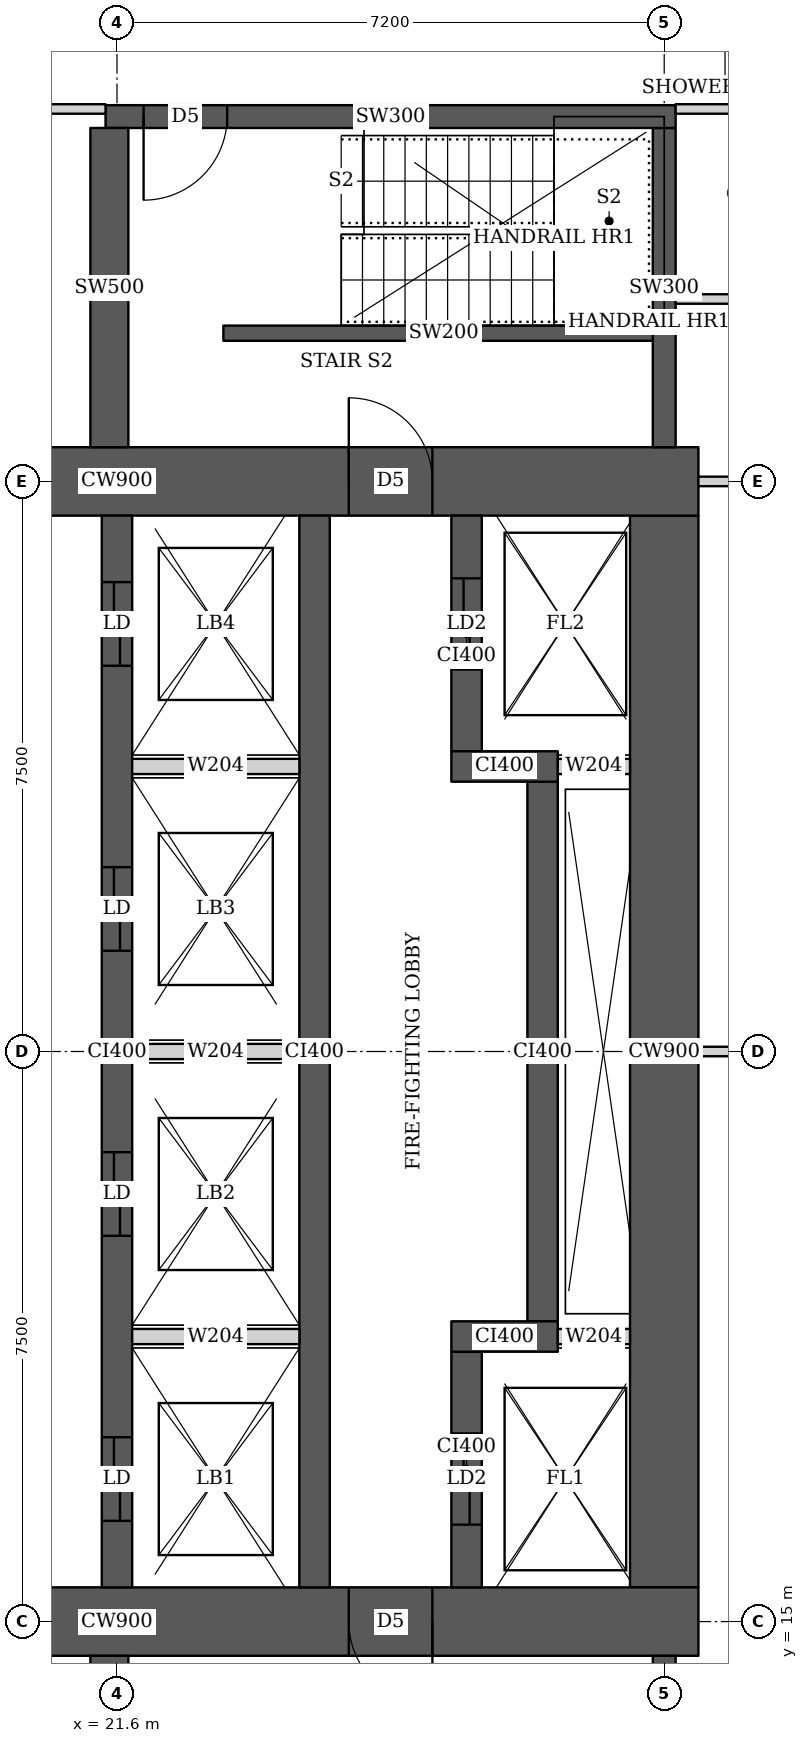
"""IFC4 building model, lengths in metres.
Left out: names, types, materials, properties, quantities, classifications, styles, units other than length and angle.
Written with IfcOpenShell. Run it as: python <this file> out.ifc"""

import sys

from ifc_helpers import new_model, si_unit, direction, frame, frame_2d, origin, place, context, subcontext, project, spatial, rectangle, extrude, element, fill, save


model = new_model("IFC4")
c1 = context("Model", 3, precision=1e-05, world=origin(), true_north=direction((0.0, 1.0)))
c2 = subcontext(c1, "Body", "Model", "MODEL_VIEW")
j1 = project(units=[si_unit("LENGTHUNIT", "METRE"), si_unit("PLANEANGLEUNIT", "RADIAN")], contexts=[c1])
p1 = place(None, origin())
s1 = spatial("IfcSite", under=j1, at=p1, CompositionType="ELEMENT")
p2 = place(p1, origin())
s2 = spatial("IfcBuilding", under=s1, at=p2, CompositionType="ELEMENT")
p3 = place(p2, frame((0.0, 0.0, 242.45)))
s3 = spatial("IfcBuildingStorey", under=s2, at=p3, CompositionType="ELEMENT", Elevation=242.45)
p4 = place(p3, frame((13.95, 15.0, 0.0), z_axis=(0.0, 0.0, 1.0), x_axis=(1.0, 0.0, 0.0)))
e1 = element("IfcWall", 1, at=p4, inside=s3, PredefinedType="SHEAR", context=c2, shape_type="SweptSolid", body=[
    extrude(rectangle(XDim=15.3, YDim=0.9, at=frame_2d((7.65, 0.0))), origin(), (0.0, 0.0, 1.0), 3.75),
])
p5 = place(p4, frame((4.45, 0.0, 0.0)))
e2 = element("IfcOpeningElement", 2, at=p5, cuts=e1, PredefinedType="OPENING", context=c2, shape_type="SweptSolid", body=[
    extrude(rectangle(XDim=1.8, YDim=2.1, at=frame_2d((0.9, 1.05))), frame((0.0, 0.46, 0.0), z_axis=(0.0, -1.0, 0.0), x_axis=(1.0, 0.0, 0.0)), (0.0, 0.0, 1.0), 0.92),
])
p6 = place(p4, frame((10.7, 0.0, 0.0)))
e3 = element("IfcOpeningElement", 3, at=p6, cuts=e1, PredefinedType="OPENING", context=c2, shape_type="SweptSolid", body=[
    extrude(rectangle(XDim=1.1, YDim=2.1, at=frame_2d((0.55, 1.05))), frame((0.0, 0.46, 0.0), z_axis=(0.0, -1.0, 0.0), x_axis=(1.0, 0.0, 0.0)), (0.0, 0.0, 1.0), 0.92),
])
p7 = place(p3, frame((13.95, 30.0, 0.0), z_axis=(0.0, 0.0, 1.0), x_axis=(1.0, 0.0, 0.0)))
e4 = element("IfcWall", 4, at=p7, inside=s3, PredefinedType="SHEAR", context=c2, shape_type="SweptSolid", body=[
    extrude(rectangle(XDim=15.3, YDim=0.9, at=frame_2d((7.65, 0.0))), origin(), (0.0, 0.0, 1.0), 3.75),
])
p8 = place(p7, frame((4.45, 0.0, 0.0)))
e5 = element("IfcOpeningElement", 5, at=p8, cuts=e4, PredefinedType="OPENING", context=c2, shape_type="SweptSolid", body=[
    extrude(rectangle(XDim=1.8, YDim=2.1, at=frame_2d((0.9, 1.05))), frame((0.0, 0.46, 0.0), z_axis=(0.0, -1.0, 0.0), x_axis=(1.0, 0.0, 0.0)), (0.0, 0.0, 1.0), 0.92),
])
p9 = place(p7, frame((10.7, 0.0, 0.0)))
e6 = element("IfcOpeningElement", 6, at=p9, cuts=e4, PredefinedType="OPENING", context=c2, shape_type="SweptSolid", body=[
    extrude(rectangle(XDim=1.1, YDim=2.1, at=frame_2d((0.55, 1.05))), frame((0.0, 0.46, 0.0), z_axis=(0.0, -1.0, 0.0), x_axis=(1.0, 0.0, 0.0)), (0.0, 0.0, 1.0), 0.92),
])
p10 = place(p3, frame((28.8, 15.45, 0.0), z_axis=(0.0, 0.0, 1.0), x_axis=(0.0, 1.0, 0.0)))
e7 = element("IfcWall", 7, at=p10, inside=s3, PredefinedType="SHEAR", context=c2, shape_type="SweptSolid", body=[
    extrude(rectangle(XDim=14.1, YDim=0.9, at=frame_2d((7.05, 0.0))), origin(), (0.0, 0.0, 1.0), 3.75),
])
p11 = place(p3, frame((21.6, 15.45, 0.0), z_axis=(0.0, 0.0, 1.0), x_axis=(0.0, 1.0, 0.0)))
e8 = element("IfcWall", 8, at=p11, inside=s3, PredefinedType="SHEAR", context=c2, shape_type="SweptSolid", body=[
    extrude(rectangle(XDim=14.1, YDim=0.4, at=frame_2d((7.05, 0.0))), origin(), (0.0, 0.0, 1.0), 3.75),
])
p12 = place(p11, frame((0.875, 0.0, 0.0)))
e9 = element("IfcOpeningElement", 9, at=p12, cuts=e8, PredefinedType="OPENING", context=c2, shape_type="SweptSolid", body=[
    extrude(rectangle(XDim=1.1, YDim=2.1, at=frame_2d((0.55, 1.05))), frame((0.0, 0.21, 0.0), z_axis=(0.0, -1.0, 0.0), x_axis=(1.0, 0.0, 0.0)), (0.0, 0.0, 1.0), 0.42),
])
p13 = place(p11, frame((4.625, 0.0, 0.0)))
e10 = element("IfcOpeningElement", 10, at=p13, cuts=e8, PredefinedType="OPENING", context=c2, shape_type="SweptSolid", body=[
    extrude(rectangle(XDim=1.1, YDim=2.1, at=frame_2d((0.55, 1.05))), frame((0.0, 0.21, 0.0), z_axis=(0.0, -1.0, 0.0), x_axis=(1.0, 0.0, 0.0)), (0.0, 0.0, 1.0), 0.42),
])
p14 = place(p11, frame((8.375, 0.0, 0.0)))
e11 = element("IfcOpeningElement", 11, at=p14, cuts=e8, PredefinedType="OPENING", context=c2, shape_type="SweptSolid", body=[
    extrude(rectangle(XDim=1.1, YDim=2.1, at=frame_2d((0.55, 1.05))), frame((0.0, 0.21, 0.0), z_axis=(0.0, -1.0, 0.0), x_axis=(1.0, 0.0, 0.0)), (0.0, 0.0, 1.0), 0.42),
])
p15 = place(p11, frame((12.125, 0.0, 0.0)))
e12 = element("IfcOpeningElement", 12, at=p15, cuts=e8, PredefinedType="OPENING", context=c2, shape_type="SweptSolid", body=[
    extrude(rectangle(XDim=1.1, YDim=2.1, at=frame_2d((0.55, 1.05))), frame((0.0, 0.21, 0.0), z_axis=(0.0, -1.0, 0.0), x_axis=(1.0, 0.0, 0.0)), (0.0, 0.0, 1.0), 0.42),
])
p16 = place(p3, frame((24.2, 15.45, 0.0), z_axis=(0.0, 0.0, 1.0), x_axis=(0.0, 1.0, 0.0)))
e13 = element("IfcWall", 13, at=p16, inside=s3, PredefinedType="SHEAR", context=c2, shape_type="SweptSolid", body=[
    extrude(rectangle(XDim=14.1, YDim=0.4, at=frame_2d((7.05, 0.0))), origin(), (0.0, 0.0, 1.0), 3.75),
])
p17 = place(p3, frame((26.2, 15.45, 0.0), z_axis=(0.0, 0.0, 1.0), x_axis=(0.0, 1.0, 0.0)))
e14 = element("IfcWall", 14, at=p17, inside=s3, PredefinedType="SHEAR", context=c2, shape_type="SweptSolid", body=[
    extrude(rectangle(XDim=3.1, YDim=0.4, at=frame_2d((1.55, 0.0))), origin(), (0.0, 0.0, 1.0), 3.75),
])
p18 = place(p17, frame((0.825, 0.0, 0.0)))
e15 = element("IfcOpeningElement", 15, at=p18, cuts=e14, PredefinedType="OPENING", context=c2, shape_type="SweptSolid", body=[
    extrude(rectangle(XDim=1.2, YDim=2.1, at=frame_2d((0.6, 1.05))), frame((0.0, 0.21, 0.0), z_axis=(0.0, -1.0, 0.0), x_axis=(1.0, 0.0, 0.0)), (0.0, 0.0, 1.0), 0.42),
])
p19 = place(p3, frame((26.0, 18.75, 0.0), z_axis=(0.0, 0.0, 1.0), x_axis=(1.0, 0.0, 0.0)))
e16 = element("IfcWall", 16, at=p19, inside=s3, PredefinedType="SHEAR", context=c2, shape_type="SweptSolid", body=[
    extrude(rectangle(XDim=1.4, YDim=0.4, at=frame_2d((0.7, 0.0))), origin(), (0.0, 0.0, 1.0), 3.75),
])
p20 = place(p3, frame((27.2, 18.95, 0.0), z_axis=(0.0, 0.0, 1.0), x_axis=(0.0, 1.0, 0.0)))
e17 = element("IfcWall", 17, at=p20, inside=s3, PredefinedType="SHEAR", context=c2, shape_type="SweptSolid", body=[
    extrude(rectangle(XDim=7.1, YDim=0.4, at=frame_2d((3.55, 0.0))), origin(), (0.0, 0.0, 1.0), 3.75),
])
p21 = place(p3, frame((26.0, 26.25, 0.0), z_axis=(0.0, 0.0, 1.0), x_axis=(1.0, 0.0, 0.0)))
e18 = element("IfcWall", 18, at=p21, inside=s3, PredefinedType="SHEAR", context=c2, shape_type="SweptSolid", body=[
    extrude(rectangle(XDim=1.4, YDim=0.4, at=frame_2d((0.7, 0.0))), origin(), (0.0, 0.0, 1.0), 3.75),
])
p22 = place(p3, frame((26.2, 26.45, 0.0), z_axis=(0.0, 0.0, 1.0), x_axis=(0.0, 1.0, 0.0)))
e19 = element("IfcWall", 19, at=p22, inside=s3, PredefinedType="SHEAR", context=c2, shape_type="SweptSolid", body=[
    extrude(rectangle(XDim=3.1, YDim=0.4, at=frame_2d((1.55, 0.0))), origin(), (0.0, 0.0, 1.0), 3.75),
])
p23 = place(p22, frame((1.075, 0.0, 0.0)))
e20 = element("IfcOpeningElement", 20, at=p23, cuts=e19, PredefinedType="OPENING", context=c2, shape_type="SweptSolid", body=[
    extrude(rectangle(XDim=1.2, YDim=2.1, at=frame_2d((0.6, 1.05))), frame((0.0, 0.21, 0.0), z_axis=(0.0, -1.0, 0.0), x_axis=(1.0, 0.0, 0.0)), (0.0, 0.0, 1.0), 0.42),
])
p24 = place(p3, frame((21.5, 10.35, 0.0), z_axis=(0.0, 0.0, 1.0), x_axis=(0.0, 1.0, 0.0)))
e21 = element("IfcWall", 21, at=p24, inside=s3, PredefinedType="SHEAR", context=c2, shape_type="SweptSolid", body=[
    extrude(rectangle(XDim=4.2, YDim=0.5, at=frame_2d((2.1, 0.0))), origin(), (0.0, 0.0, 1.0), 3.75),
])
p25 = place(p3, frame((28.8, 10.35, 0.0), z_axis=(0.0, 0.0, 1.0), x_axis=(0.0, 1.0, 0.0)))
e22 = element("IfcWall", 22, at=p25, inside=s3, PredefinedType="SHEAR", context=c2, shape_type="SweptSolid", body=[
    extrude(rectangle(XDim=4.2, YDim=0.3, at=frame_2d((2.1, 0.0))), origin(), (0.0, 0.0, 1.0), 3.75),
])
p26 = place(p3, frame((21.45, 34.8, 0.0), z_axis=(0.0, 0.0, 1.0), x_axis=(1.0, 0.0, 0.0)))
e23 = element("IfcWall", 23, at=p26, inside=s3, PredefinedType="SHEAR", context=c2, shape_type="SweptSolid", body=[
    extrude(rectangle(XDim=7.5, YDim=0.3, at=frame_2d((3.75, 0.0))), origin(), (0.0, 0.0, 1.0), 3.75),
])
p27 = place(p26, frame((0.5, 0.0, 0.0)))
e24 = element("IfcOpeningElement", 24, at=p27, cuts=e23, PredefinedType="OPENING", context=c2, shape_type="SweptSolid", body=[
    extrude(rectangle(XDim=1.1, YDim=2.1, at=frame_2d((0.55, 1.05))), frame((0.0, 0.16, 0.0), z_axis=(0.0, -1.0, 0.0), x_axis=(1.0, 0.0, 0.0)), (0.0, 0.0, 1.0), 0.32),
])
p28 = place(p3, frame((21.5, 30.45, 0.0), z_axis=(0.0, 0.0, 1.0), x_axis=(0.0, 1.0, 0.0)))
e25 = element("IfcWall", 25, at=p28, inside=s3, PredefinedType="SHEAR", context=c2, shape_type="SweptSolid", body=[
    extrude(rectangle(XDim=4.2, YDim=0.5, at=frame_2d((2.1, 0.0))), origin(), (0.0, 0.0, 1.0), 3.75),
])
p29 = place(p3, frame((28.8, 30.45, 0.0), z_axis=(0.0, 0.0, 1.0), x_axis=(0.0, 1.0, 0.0)))
e26 = element("IfcWall", 26, at=p29, inside=s3, PredefinedType="SHEAR", context=c2, shape_type="SweptSolid", body=[
    extrude(rectangle(XDim=4.2, YDim=0.3, at=frame_2d((2.1, 0.0))), origin(), (0.0, 0.0, 1.0), 3.75),
])
p30 = place(p3, frame((13.75, 34.9, 0.0), z_axis=(0.0, 0.0, 1.0), x_axis=(1.0, 0.0, 0.0)))
e27 = element("IfcWall", 27, at=p30, inside=s3, PredefinedType="PARTITIONING", context=c2, shape_type="SweptSolid", body=[
    extrude(rectangle(XDim=7.7, YDim=0.125, at=frame_2d((3.85, 0.0))), origin(), (0.0, 0.0, 1.0), 3.45),
])
p31 = place(p30, frame((4.15, 0.0, 0.0)))
e28 = element("IfcOpeningElement", 28, at=p31, cuts=e27, PredefinedType="OPENING", context=c2, shape_type="SweptSolid", body=[
    extrude(rectangle(XDim=1.8, YDim=2.1, at=frame_2d((0.9, 1.05))), frame((0.0, 0.073, 0.0), z_axis=(0.0, -1.0, 0.0), x_axis=(1.0, 0.0, 0.0)), (0.0, 0.0, 1.0), 0.145),
])
p32 = place(p3, frame((28.95, 34.9, 0.0), z_axis=(0.0, 0.0, 1.0), x_axis=(1.0, 0.0, 0.0)))
e29 = element("IfcWall", 29, at=p32, inside=s3, PredefinedType="PARTITIONING", context=c2, shape_type="SweptSolid", body=[
    extrude(rectangle(XDim=4.588, YDim=0.125, at=frame_2d((2.294, 0.0))), origin(), (0.0, 0.0, 1.0), 3.45),
])
for number, where, z_axis, x_axis in (
    (30, (29.25, 22.5, 0.0), (0.0, 0.0, 1.0), (1.0, 0.0, 0.0)),
    (31, (29.25, 30.0, 0.0), (0.0, 0.0, 1.0), (1.0, 0.0, 0.0)),
):
    element("IfcWall", number, at=place(p3, frame(where, z_axis=z_axis, x_axis=x_axis)), inside=s3, PredefinedType="PARTITIONING", context=c2, shape_type="SweptSolid", body=[
        extrude(rectangle(XDim=3.049, YDim=0.125, at=frame_2d((1.524, 0.0))), origin(), (0.0, 0.0, 1.0), 3.45),
    ])
p33 = place(p3, frame((28.95, 32.4, 0.0), z_axis=(0.0, 0.0, 1.0), x_axis=(1.0, 0.0, 0.0)))
e32 = element("IfcWall", 32, at=p33, inside=s3, PredefinedType="PARTITIONING", context=c2, shape_type="SweptSolid", body=[
    extrude(rectangle(XDim=4.976, YDim=0.125, at=frame_2d((2.488, 0.0))), origin(), (0.0, 0.0, 1.0), 3.45),
])
p34 = place(p3, frame((23.0, 31.95, 0.0), z_axis=(0.0, 0.0, 1.0), x_axis=(1.0, 0.0, 0.0)))
e33 = element("IfcWall", 33, at=p34, inside=s3, PredefinedType="SHEAR", context=c2, shape_type="SweptSolid", body=[
    extrude(rectangle(XDim=5.8, YDim=0.2, at=frame_2d((2.9, 0.0))), origin(), (0.0, 0.0, 1.0), 3.75),
])
for number, where, z_axis, x_axis in (
    (34, (21.8, 18.75, 0.0), (0.0, 0.0, 1.0), (1.0, 0.0, 0.0)),
    (35, (21.8, 22.5, 0.0), (0.0, 0.0, 1.0), (1.0, 0.0, 0.0)),
    (36, (21.8, 26.25, 0.0), (0.0, 0.0, 1.0), (1.0, 0.0, 0.0)),
):
    element("IfcWall", number, at=place(p3, frame(where, z_axis=z_axis, x_axis=x_axis)), inside=s3, PredefinedType="SOLIDWALL", context=c2, shape_type="SweptSolid", body=[
        extrude(rectangle(XDim=2.2, YDim=0.2, at=frame_2d((1.1, 0.0))), origin(), (0.0, 0.0, 1.0), 3.45),
    ])
for number, where, z_axis, x_axis in (
    (37, (27.4, 18.75, 0.0), (0.0, 0.0, 1.0), (1.0, 0.0, 0.0)),
    (38, (27.4, 26.25, 0.0), (0.0, 0.0, 1.0), (1.0, 0.0, 0.0)),
):
    element("IfcWall", number, at=place(p3, frame(where, z_axis=z_axis, x_axis=x_axis)), inside=s3, PredefinedType="SOLIDWALL", context=c2, shape_type="SweptSolid", body=[
        extrude(rectangle(XDim=0.95, YDim=0.2, at=frame_2d((0.475, 0.0))), origin(), (0.0, 0.0, 1.0), 3.45),
    ])
p35 = place(p6, origin())
e39 = element("IfcDoor", 39, at=p35, inside=s3, OperationType="SINGLE_SWING_LEFT", PredefinedType="DOOR", context=c2, shape_type="SweptSolid", body=[
    extrude(rectangle(XDim=1.1, YDim=2.1, at=frame_2d((0.55, 1.05))), frame((0.0, 0.025, 0.0), z_axis=(0.0, -1.0, 0.0), x_axis=(1.0, 0.0, 0.0)), (0.0, 0.0, 1.0), 0.05),
])
fill(e3, e39)
p36 = place(p9, origin())
e40 = element("IfcDoor", 40, at=p36, inside=s3, OperationType="SINGLE_SWING_LEFT", PredefinedType="DOOR", context=c2, shape_type="SweptSolid", body=[
    extrude(rectangle(XDim=1.1, YDim=2.1, at=frame_2d((0.55, 1.05))), frame((0.0, 0.025, 0.0), z_axis=(0.0, -1.0, 0.0), x_axis=(1.0, 0.0, 0.0)), (0.0, 0.0, 1.0), 0.05),
])
fill(e6, e40)
p37 = place(p18, origin())
e41 = element("IfcDoor", 41, at=p37, inside=s3, OperationType="DOUBLE_DOOR_SLIDING", PredefinedType="DOOR", context=c2, shape_type="SweptSolid", body=[
    extrude(rectangle(XDim=1.2, YDim=2.1, at=frame_2d((0.6, 1.05))), frame((0.0, 0.025, 0.0), z_axis=(0.0, -1.0, 0.0), x_axis=(1.0, 0.0, 0.0)), (0.0, 0.0, 1.0), 0.05),
])
fill(e15, e41)
p38 = place(p23, origin())
e42 = element("IfcDoor", 42, at=p38, inside=s3, OperationType="DOUBLE_DOOR_SLIDING", PredefinedType="DOOR", context=c2, shape_type="SweptSolid", body=[
    extrude(rectangle(XDim=1.2, YDim=2.1, at=frame_2d((0.6, 1.05))), frame((0.0, 0.025, 0.0), z_axis=(0.0, -1.0, 0.0), x_axis=(1.0, 0.0, 0.0)), (0.0, 0.0, 1.0), 0.05),
])
fill(e20, e42)
p39 = place(p12, origin())
e43 = element("IfcDoor", 43, at=p39, inside=s3, OperationType="DOUBLE_DOOR_SLIDING", PredefinedType="DOOR", context=c2, shape_type="SweptSolid", body=[
    extrude(rectangle(XDim=1.1, YDim=2.1, at=frame_2d((0.55, 1.05))), frame((0.0, 0.025, 0.0), z_axis=(0.0, -1.0, 0.0), x_axis=(1.0, 0.0, 0.0)), (0.0, 0.0, 1.0), 0.05),
])
fill(e9, e43)
p40 = place(p13, origin())
e44 = element("IfcDoor", 44, at=p40, inside=s3, OperationType="DOUBLE_DOOR_SLIDING", PredefinedType="DOOR", context=c2, shape_type="SweptSolid", body=[
    extrude(rectangle(XDim=1.1, YDim=2.1, at=frame_2d((0.55, 1.05))), frame((0.0, 0.025, 0.0), z_axis=(0.0, -1.0, 0.0), x_axis=(1.0, 0.0, 0.0)), (0.0, 0.0, 1.0), 0.05),
])
fill(e10, e44)
p41 = place(p14, origin())
e45 = element("IfcDoor", 45, at=p41, inside=s3, OperationType="DOUBLE_DOOR_SLIDING", PredefinedType="DOOR", context=c2, shape_type="SweptSolid", body=[
    extrude(rectangle(XDim=1.1, YDim=2.1, at=frame_2d((0.55, 1.05))), frame((0.0, 0.025, 0.0), z_axis=(0.0, -1.0, 0.0), x_axis=(1.0, 0.0, 0.0)), (0.0, 0.0, 1.0), 0.05),
])
fill(e11, e45)
p42 = place(p15, origin())
e46 = element("IfcDoor", 46, at=p42, inside=s3, OperationType="DOUBLE_DOOR_SLIDING", PredefinedType="DOOR", context=c2, shape_type="SweptSolid", body=[
    extrude(rectangle(XDim=1.1, YDim=2.1, at=frame_2d((0.55, 1.05))), frame((0.0, 0.025, 0.0), z_axis=(0.0, -1.0, 0.0), x_axis=(1.0, 0.0, 0.0)), (0.0, 0.0, 1.0), 0.05),
])
fill(e12, e46)
p43 = place(p27, origin())
e47 = element("IfcDoor", 47, at=p43, inside=s3, OperationType="SINGLE_SWING_RIGHT", PredefinedType="DOOR", context=c2, shape_type="SweptSolid", body=[
    extrude(rectangle(XDim=1.1, YDim=2.1, at=frame_2d((0.55, 1.05))), frame((0.0, 0.025, 0.0), z_axis=(0.0, -1.0, 0.0), x_axis=(1.0, 0.0, 0.0)), (0.0, 0.0, 1.0), 0.05),
])
fill(e24, e47)
save(model, sys.argv[1])
